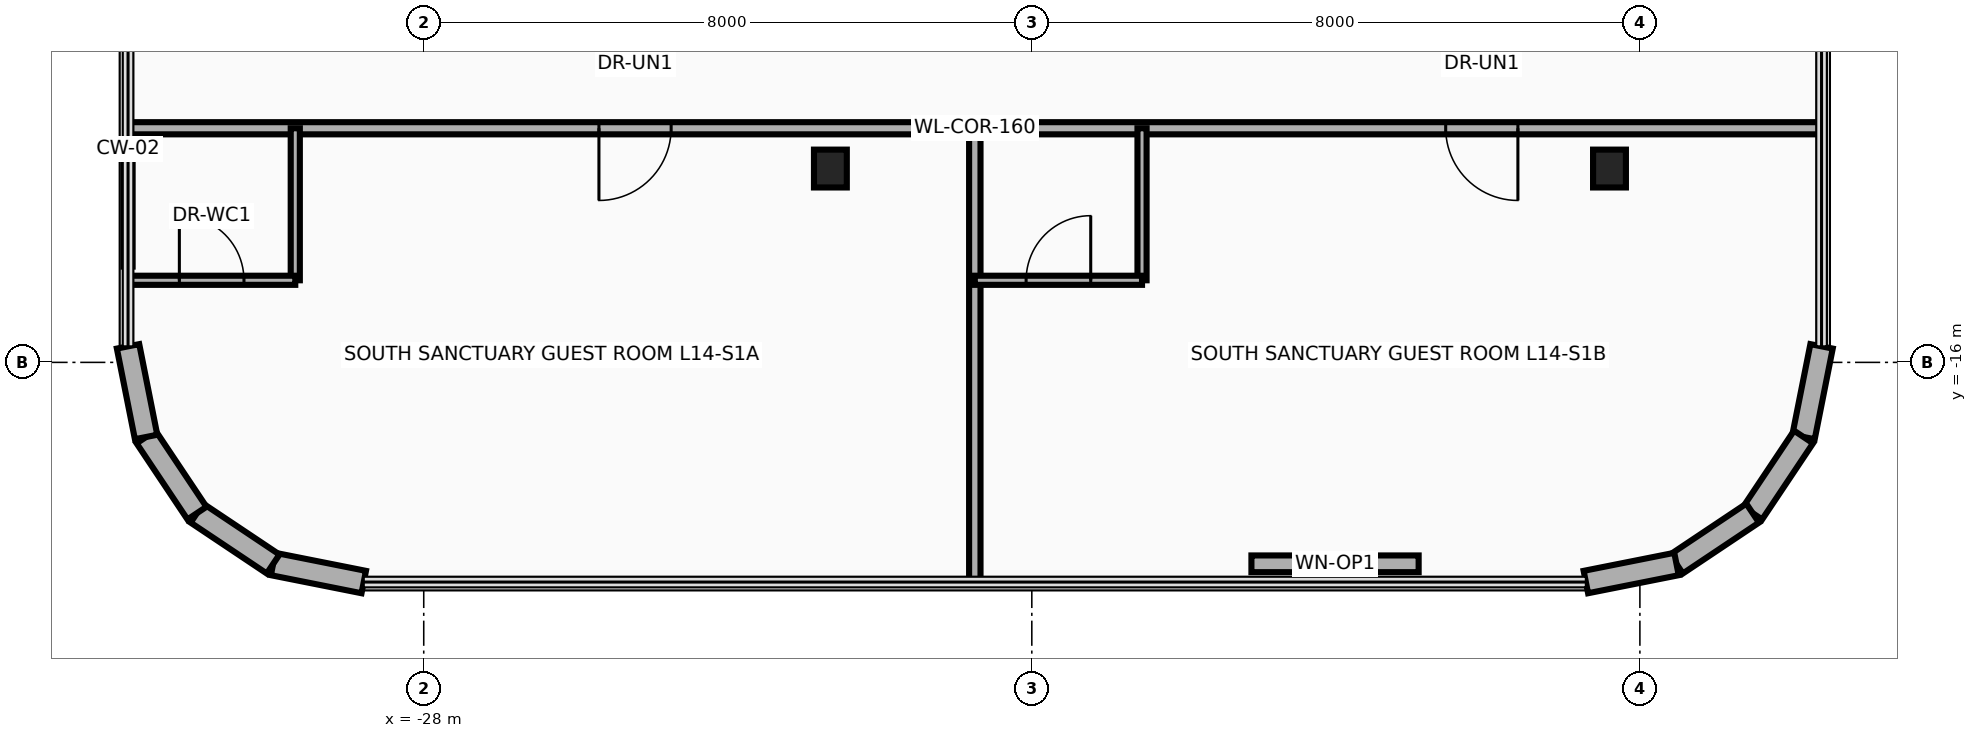
"""IFC4 building model, lengths in metres.
Left out: names, types, materials, properties, quantities, classifications, styles, units other than length and angle.
Written with IfcOpenShell. Run it as: python <this file> out.ifc"""

import sys

from ifc_helpers import new_model, si_unit, direction, frame, frame_2d, origin, origin_2d, place, context, subcontext, project, spatial, rectangle, i_section, extrude, source, transform, mapped, element, fill, save


model = new_model("IFC4")
c1 = context("Model", 3, precision=1e-05, world=origin(), true_north=direction((0.0, 1.0)))
c2 = subcontext(c1, "Body", "Model", "MODEL_VIEW")
j1 = project(units=[si_unit("LENGTHUNIT", "METRE"), si_unit("PLANEANGLEUNIT", "RADIAN")], contexts=[c1])
p1 = place(None, origin())
s1 = spatial("IfcSite", under=j1, at=p1, CompositionType="ELEMENT")
p2 = place(p1, origin())
s2 = spatial("IfcBuilding", under=s1, at=p2, CompositionType="ELEMENT")
p3 = place(p2, frame((0.0, 0.0, 59.3)))
s3 = spatial("IfcBuildingStorey", under=s2, at=p3, CompositionType="ELEMENT", Elevation=59.3)
m1 = source(origin(), c2, "Body", "SweptSolid", [
    extrude(i_section(OverallWidth=0.432, OverallDepth=0.498, WebThickness=0.056, FlangeThickness=0.089, at=origin_2d()), origin(), (0.0, 0.0, 1.0), 3.7),
])
for number, where, z_axis, x_axis in (
    (1, (-22.65, -13.45, 0.0), (0.0, 0.0, 1.0), (1.0, 0.0, 0.0)),
    (2, (-12.4, -13.45, 0.0), (0.0, 0.0, 1.0), (1.0, 0.0, 0.0)),
):
    element("IfcColumn", number, at=place(p3, frame(where, z_axis=z_axis, x_axis=x_axis)), inside=s3, PredefinedType="COLUMN", context=c2, shape_type="MappedRepresentation", body=[
        mapped(m1, transform((0.0, 0.0, 0.0), x_axis=(1.0, 0.0, 0.0), y_axis=(0.0, 1.0, 0.0), z_axis=(0.0, 0.0, 1.0), scale=1.0)),
    ])
p4 = place(p3, frame((-9.61, -15.789, 0.0), z_axis=(0.0, 0.0, 1.0), x_axis=(-0.194996050505, -0.980804027463, 0.0)))
e3 = element("IfcWall", 3, at=p4, inside=s3, PredefinedType="SOLIDWALL", context=c2, shape_type="SweptSolid", body=[
    extrude(rectangle(XDim=1.216, YDim=0.3, at=frame_2d((0.608, 0.0))), origin(), (0.0, 0.0, 1.0), 3.46),
])
for number, where, z_axis, x_axis in (
    (4, (-9.847, -16.982, 0.0), (0.0, 0.0, 1.0), (-0.556, -0.831, 0.0)),
    (5, (-10.517, -17.983, 0.0), (0.0, 0.0, 1.0), (-0.831, -0.556, 0.0)),
):
    element("IfcWall", number, at=place(p3, frame(where, z_axis=z_axis, x_axis=x_axis)), inside=s3, PredefinedType="SOLIDWALL", context=c2, shape_type="SweptSolid", body=[
        extrude(rectangle(XDim=1.205, YDim=0.3, at=frame_2d((0.603, 0.0))), origin(), (0.0, 0.0, 1.0), 3.46),
    ])
p5 = place(p3, frame((-11.518, -18.653, 0.0), z_axis=(0.0, 0.0, 1.0), x_axis=(-0.980804027463, -0.194996050505, 0.0)))
e6 = element("IfcWall", 6, at=p5, inside=s3, PredefinedType="SOLIDWALL", context=c2, shape_type="SweptSolid", body=[
    extrude(rectangle(XDim=1.216, YDim=0.3, at=frame_2d((0.608, 0.0))), origin(), (0.0, 0.0, 1.0), 3.46),
])
p6 = place(p3, frame((-14.911, -18.65, 0.0), z_axis=(0.0, 0.0, 1.0), x_axis=(-1.0, 0.0, 0.0)))
e7 = element("IfcWall", 7, at=p6, inside=s3, PredefinedType="SOLIDWALL", context=c2, shape_type="SweptSolid", body=[
    extrude(rectangle(XDim=2.2, YDim=0.22, at=frame_2d((1.1, 0.0))), origin(), (0.0, 0.0, 1.0), 3.46),
])
p7 = place(p6, frame((0.65, 0.0, 0.95)))
e8 = element("IfcOpeningElement", 8, at=p7, cuts=e7, PredefinedType="OPENING", context=c2, shape_type="SweptSolid", body=[
    extrude(rectangle(XDim=0.9, YDim=1.3, at=frame_2d((0.45, 0.65))), frame((0.0, 0.125, 0.0), z_axis=(0.0, -1.0, 0.0), x_axis=(1.0, 0.0, 0.0)), (0.0, 0.0, 1.0), 0.25),
])
p8 = place(p3, frame((-28.789, -18.89, 0.0), z_axis=(0.0, 0.0, 1.0), x_axis=(-0.980804027463, 0.194996050505, 0.0)))
e9 = element("IfcWall", 9, at=p8, inside=s3, PredefinedType="SOLIDWALL", context=c2, shape_type="SweptSolid", body=[
    extrude(rectangle(XDim=1.216, YDim=0.3, at=frame_2d((0.608, 0.0))), origin(), (0.0, 0.0, 1.0), 3.46),
])
for number, where, z_axis, x_axis in (
    (10, (-29.982, -18.653, 0.0), (0.0, 0.0, 1.0), (-0.831, 0.556, 0.0)),
    (11, (-30.983, -17.983, 0.0), (0.0, 0.0, 1.0), (-0.556, 0.831, 0.0)),
):
    element("IfcWall", number, at=place(p3, frame(where, z_axis=z_axis, x_axis=x_axis)), inside=s3, PredefinedType="SOLIDWALL", context=c2, shape_type="SweptSolid", body=[
        extrude(rectangle(XDim=1.205, YDim=0.3, at=frame_2d((0.603, 0.0))), origin(), (0.0, 0.0, 1.0), 3.46),
    ])
p9 = place(p3, frame((-31.653, -16.982, 0.0), z_axis=(0.0, 0.0, 1.0), x_axis=(-0.194996050505, 0.980804027463, 0.0)))
e12 = element("IfcWall", 12, at=p9, inside=s3, PredefinedType="SOLIDWALL", context=c2, shape_type="SweptSolid", body=[
    extrude(rectangle(XDim=1.216, YDim=0.3, at=frame_2d((0.608, 0.0))), origin(), (0.0, 0.0, 1.0), 3.46),
])
p10 = place(p3, frame((-31.89, -12.92, 0.0), z_axis=(0.0, 0.0, 1.0), x_axis=(1.0, 0.0, 0.0)))
e13 = element("IfcWall", 13, at=p10, inside=s3, PredefinedType="PARTITIONING", context=c2, shape_type="SweptSolid", body=[
    extrude(rectangle(XDim=22.28, YDim=0.16, at=frame_2d((11.14, 0.0))), origin(), (0.0, 0.0, 1.0), 2.834),
])
p11 = place(p10, frame((6.195, 0.0, 0.0)))
e14 = element("IfcOpeningElement", 14, at=p11, cuts=e13, PredefinedType="OPENING", context=c2, shape_type="SweptSolid", body=[
    extrude(rectangle(XDim=0.95, YDim=2.15, at=frame_2d((0.475, 1.075))), frame((0.0, 0.095, 0.0), z_axis=(0.0, -1.0, 0.0), x_axis=(1.0, 0.0, 0.0)), (0.0, 0.0, 1.0), 0.19),
])
p12 = place(p10, frame((17.335, 0.0, 0.0)))
e15 = element("IfcOpeningElement", 15, at=p12, cuts=e13, PredefinedType="OPENING", context=c2, shape_type="SweptSolid", body=[
    extrude(rectangle(XDim=0.95, YDim=2.15, at=frame_2d((0.475, 1.075))), frame((0.0, 0.095, 0.0), z_axis=(0.0, -1.0, 0.0), x_axis=(1.0, 0.0, 0.0)), (0.0, 0.0, 1.0), 0.19),
])
p13 = place(p3, frame((-20.75, -18.89, 0.0), z_axis=(0.0, 0.0, 1.0), x_axis=(0.0, 1.0, 0.0)))
e16 = element("IfcWall", 16, at=p13, inside=s3, PredefinedType="PARTITIONING", context=c2, shape_type="SweptSolid", body=[
    extrude(rectangle(XDim=5.97, YDim=0.15, at=frame_2d((2.985, 0.0))), origin(), (0.0, 0.0, 1.0), 2.896),
])
p14 = place(p3, frame((-29.69, -14.92, 0.0), z_axis=(0.0, 0.0, 1.0), x_axis=(0.0, 1.0, 0.0)))
e17 = element("IfcWall", 17, at=p14, inside=s3, PredefinedType="PARTITIONING", context=c2, shape_type="SweptSolid", body=[
    extrude(rectangle(XDim=2.0, YDim=0.12, at=frame_2d((1.0, 0.0))), origin(), (0.0, 0.0, 1.0), 3.46),
])
p15 = place(p3, frame((-31.89, -14.92, 0.0), z_axis=(0.0, 0.0, 1.0), x_axis=(1.0, 0.0, 0.0)))
e18 = element("IfcWall", 18, at=p15, inside=s3, PredefinedType="PARTITIONING", context=c2, shape_type="SweptSolid", body=[
    extrude(rectangle(XDim=2.2, YDim=0.12, at=frame_2d((1.1, 0.0))), origin(), (0.0, 0.0, 1.0), 3.46),
])
p16 = place(p15, frame((0.675, 0.0, 0.0)))
e19 = element("IfcOpeningElement", 19, at=p16, cuts=e18, PredefinedType="OPENING", context=c2, shape_type="SweptSolid", body=[
    extrude(rectangle(XDim=0.85, YDim=2.1, at=frame_2d((0.425, 1.05))), frame((0.0, 0.075, 0.0), z_axis=(0.0, -1.0, 0.0), x_axis=(1.0, 0.0, 0.0)), (0.0, 0.0, 1.0), 0.15),
])
p17 = place(p3, frame((-31.89, -14.74, 0.0), z_axis=(0.0, 0.0, 1.0), x_axis=(0.0, 1.0, 0.0)))
e20 = element("IfcWall", 20, at=p17, inside=s3, PredefinedType="PARTITIONING", context=c2, shape_type="SweptSolid", body=[
    extrude(rectangle(XDim=1.62, YDim=0.12, at=frame_2d((0.81, 0.0))), origin(), (0.0, 0.0, 1.0), 3.46),
])
p18 = place(p3, frame((-18.55, -14.92, 0.0), z_axis=(0.0, 0.0, 1.0), x_axis=(0.0, 1.0, 0.0)))
e21 = element("IfcWall", 21, at=p18, inside=s3, PredefinedType="PARTITIONING", context=c2, shape_type="SweptSolid", body=[
    extrude(rectangle(XDim=2.0, YDim=0.12, at=frame_2d((1.0, 0.0))), origin(), (0.0, 0.0, 1.0), 2.896),
])
p19 = place(p3, frame((-20.75, -14.92, 0.0), z_axis=(0.0, 0.0, 1.0), x_axis=(1.0, 0.0, 0.0)))
e22 = element("IfcWall", 22, at=p19, inside=s3, PredefinedType="PARTITIONING", context=c2, shape_type="SweptSolid", body=[
    extrude(rectangle(XDim=2.2, YDim=0.12, at=frame_2d((1.1, 0.0))), origin(), (0.0, 0.0, 1.0), 3.46),
])
p20 = place(p19, frame((0.675, 0.0, 0.0)))
e23 = element("IfcOpeningElement", 23, at=p20, cuts=e22, PredefinedType="OPENING", context=c2, shape_type="SweptSolid", body=[
    extrude(rectangle(XDim=0.85, YDim=2.1, at=frame_2d((0.425, 1.05))), frame((0.0, 0.075, 0.0), z_axis=(0.0, -1.0, 0.0), x_axis=(1.0, 0.0, 0.0)), (0.0, 0.0, 1.0), 0.15),
])
p21 = place(p7, origin())
e24 = element("IfcWindow", 24, at=p21, inside=s3, PartitioningType="SINGLE_PANEL", PredefinedType="WINDOW", context=c2, shape_type="SweptSolid", body=[
    extrude(rectangle(XDim=0.9, YDim=1.3, at=frame_2d((0.45, 0.65))), frame((0.0, 0.03, 0.0), z_axis=(0.0, -1.0, 0.0), x_axis=(1.0, 0.0, 0.0)), (0.0, 0.0, 1.0), 0.06),
])
fill(e8, e24)
p22 = place(p11, frame((0.95, 0.0, 0.0), z_axis=(0.0, 0.0, 1.0), x_axis=(-1.0, 0.0, 0.0)))
e25 = element("IfcDoor", 25, at=p22, inside=s3, OperationType="SINGLE_SWING_LEFT", PredefinedType="DOOR", context=c2, shape_type="SweptSolid", body=[
    extrude(rectangle(XDim=0.95, YDim=2.15, at=frame_2d((0.475, 1.075))), frame((0.0, 0.025, 0.0), z_axis=(0.0, -1.0, 0.0), x_axis=(1.0, 0.0, 0.0)), (0.0, 0.0, 1.0), 0.05),
])
fill(e14, e25)
p23 = place(p16, origin())
e26 = element("IfcDoor", 26, at=p23, inside=s3, OperationType="SINGLE_SWING_RIGHT", PredefinedType="DOOR", context=c2, shape_type="SweptSolid", body=[
    extrude(rectangle(XDim=0.85, YDim=2.1, at=frame_2d((0.425, 1.05))), frame((0.0, 0.025, 0.0), z_axis=(0.0, -1.0, 0.0), x_axis=(1.0, 0.0, 0.0)), (0.0, 0.0, 1.0), 0.05),
])
fill(e19, e26)
p24 = place(p12, frame((0.95, 0.0, 0.0), z_axis=(0.0, 0.0, 1.0), x_axis=(-1.0, 0.0, 0.0)))
e27 = element("IfcDoor", 27, at=p24, inside=s3, OperationType="SINGLE_SWING_LEFT", PredefinedType="DOOR", context=c2, shape_type="SweptSolid", body=[
    extrude(rectangle(XDim=0.95, YDim=2.15, at=frame_2d((0.475, 1.075))), frame((0.0, 0.025, 0.0), z_axis=(0.0, -1.0, 0.0), x_axis=(1.0, 0.0, 0.0)), (0.0, 0.0, 1.0), 0.05),
])
fill(e15, e27)
p25 = place(p20, origin())
e28 = element("IfcDoor", 28, at=p25, inside=s3, OperationType="SINGLE_SWING_RIGHT", PredefinedType="DOOR", context=c2, shape_type="SweptSolid", body=[
    extrude(rectangle(XDim=0.85, YDim=2.1, at=frame_2d((0.425, 1.05))), frame((0.0, 0.025, 0.0), z_axis=(0.0, -1.0, 0.0), x_axis=(1.0, 0.0, 0.0)), (0.0, 0.0, 1.0), 0.05),
])
fill(e23, e28)
save(model, sys.argv[1])
